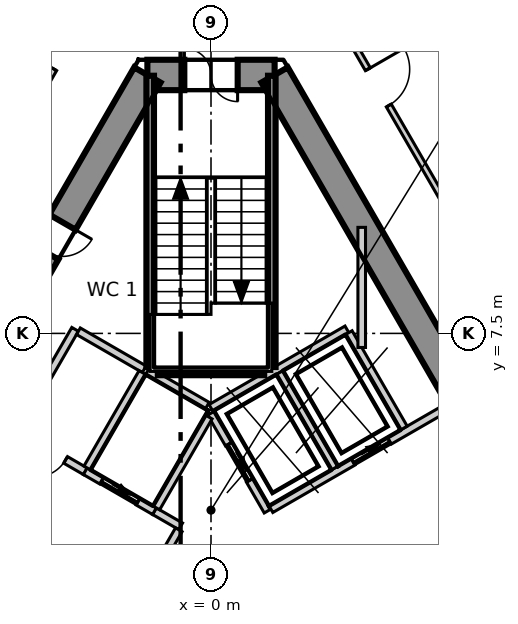
"""IFC4 building model, lengths in metres.
Left out: names, types, materials, properties, quantities, classifications, styles, units other than length and angle.
Written with IfcOpenShell. Run it as: python <this file> out.ifc"""

import sys

from ifc_helpers import new_model, si_unit, direction, frame, frame_2d, origin, place, context, subcontext, project, spatial, polyline, rectangle, outline, extrude, element, fill, save


model = new_model("IFC4")
c1 = context("Model", 3, precision=1e-05, world=origin(), true_north=direction((0.0, 1.0)))
c2 = subcontext(c1, "Body", "Model", "MODEL_VIEW")
j1 = project(units=[si_unit("LENGTHUNIT", "METRE"), si_unit("PLANEANGLEUNIT", "RADIAN")], contexts=[c1])
p1 = place(None, origin())
s1 = spatial("IfcSite", under=j1, at=p1, CompositionType="ELEMENT")
p2 = place(p1, origin())
s2 = spatial("IfcBuilding", under=s1, at=p2, CompositionType="ELEMENT")
p3 = place(p2, frame((0.0, 0.0, 104.3)))
s3 = spatial("IfcBuildingStorey", under=s2, at=p3, CompositionType="ELEMENT", Elevation=104.3)
p4 = place(p3, frame((1.674, 14.3, -0.3), z_axis=(0.0, 0.0, 1.0), x_axis=(-1.0, 0.0, 0.0)))
e1 = element("IfcWall", 1, at=p4, inside=s3, PredefinedType="SHEAR", context=c2, shape_type="SweptSolid", body=[
    extrude(outline(polyline([(-0.231, -0.4), (1.674, -0.4), (3.579, -0.4), (3.117, 0.4), (1.674, 0.4), (0.231, 0.4), (-0.231, -0.4)])), origin(), (0.0, 0.0, 1.0), 4.0),
])
p5 = place(p4, frame((0.974, 0.0, 0.3)))
e2 = element("IfcOpeningElement", 2, at=p5, cuts=e1, PredefinedType="OPENING", context=c2, shape_type="SweptSolid", body=[
    extrude(rectangle(XDim=1.4, YDim=2.1, at=frame_2d((0.7, 1.05))), frame((0.0, 0.41, 0.0), z_axis=(0.0, -1.0, 0.0), x_axis=(1.0, 0.0, 0.0)), (0.0, 0.0, 1.0), 0.82),
])
p6 = place(p3, frame((-1.674, 14.3, -0.3), z_axis=(0.0, 0.0, 1.0), x_axis=(-0.499995765644, -0.866027848477, 0.0)))
e3 = element("IfcWall", 3, at=p6, inside=s3, PredefinedType="SHEAR", context=c2, shape_type="SweptSolid", body=[
    extrude(outline(polyline([(-0.231, -0.4), (1.732, -0.4), (3.695, -0.4), (5.658, -0.4), (7.621, -0.4), (9.584, -0.4), (11.547, -0.4), (13.51, -0.4), (15.473, -0.4), (17.436, -0.4), (19.399, -0.4), (21.362, -0.4), (23.325, -0.4), (22.863, 0.4), (20.977, 0.4), (19.091, 0.4), (17.205, 0.4), (15.319, 0.4), (13.433, 0.4), (11.547, 0.4), (9.661, 0.4), (7.775, 0.4), (5.889, 0.4), (4.003, 0.4), (2.117, 0.4), (0.231, 0.4), (-0.231, -0.4)])), origin(), (0.0, 0.0, 1.0), 4.0),
])
p7 = place(p6, frame((10.997, 0.0, 0.3)))
e4 = element("IfcOpeningElement", 4, at=p7, cuts=e3, PredefinedType="OPENING", context=c2, shape_type="SweptSolid", body=[
    extrude(rectangle(XDim=1.1, YDim=2.1, at=frame_2d((0.55, 1.05))), frame((0.0, 0.41, 0.0), z_axis=(0.0, -1.0, 0.0), x_axis=(1.0, 0.0, 0.0)), (0.0, 0.0, 1.0), 0.82),
])
p8 = place(p6, frame((4.474, 0.0, 0.3)))
e5 = element("IfcOpeningElement", 5, at=p8, cuts=e3, PredefinedType="OPENING", context=c2, shape_type="SweptSolid", body=[
    extrude(rectangle(XDim=0.9, YDim=2.1, at=frame_2d((0.45, 1.05))), frame((0.0, 0.41, 0.0), z_axis=(0.0, -1.0, 0.0), x_axis=(1.0, 0.0, 0.0)), (0.0, 0.0, 1.0), 0.82),
])
p9 = place(p3, frame((13.221, -5.7, -0.3), z_axis=(0.0, 0.0, 1.0), x_axis=(-0.499995765644, 0.866027848477, 0.0)))
e6 = element("IfcWall", 6, at=p9, inside=s3, PredefinedType="SHEAR", context=c2, shape_type="SweptSolid", body=[
    extrude(outline(polyline([(-0.231, -0.4), (1.732, -0.4), (3.695, -0.4), (5.658, -0.4), (7.621, -0.4), (9.584, -0.4), (11.547, -0.4), (13.51, -0.4), (15.473, -0.4), (17.436, -0.4), (19.399, -0.4), (21.362, -0.4), (23.325, -0.4), (22.863, 0.4), (20.977, 0.4), (19.091, 0.4), (17.205, 0.4), (15.319, 0.4), (13.433, 0.4), (11.547, 0.4), (9.661, 0.4), (7.775, 0.4), (5.889, 0.4), (4.003, 0.4), (2.117, 0.4), (0.231, 0.4), (-0.231, -0.4)])), origin(), (0.0, 0.0, 1.0), 4.0),
])
p10 = place(p9, frame((10.647, 0.0, 0.3)))
e7 = element("IfcOpeningElement", 7, at=p10, cuts=e6, PredefinedType="OPENING", context=c2, shape_type="SweptSolid", body=[
    extrude(rectangle(XDim=1.8, YDim=2.1, at=frame_2d((0.9, 1.05))), frame((0.0, 0.41, 0.0), z_axis=(0.0, -1.0, 0.0), x_axis=(1.0, 0.0, 0.0)), (0.0, 0.0, 1.0), 0.82),
])
p11 = place(p9, frame((5.343, 0.0, 0.3)))
e8 = element("IfcOpeningElement", 8, at=p11, cuts=e6, PredefinedType="OPENING", context=c2, shape_type="SweptSolid", body=[
    extrude(rectangle(XDim=0.9, YDim=2.1, at=frame_2d((0.45, 1.05))), frame((0.0, 0.41, 0.0), z_axis=(0.0, -1.0, 0.0), x_axis=(1.0, 0.0, 0.0)), (0.0, 0.0, 1.0), 0.82),
])
p12 = place(p3, frame((-3.2, 35.691, 0.0), z_axis=(0.0, 0.0, 1.0), x_axis=(-0.500010127185, -0.866019556773, 0.0)))
e9 = element("IfcWall", 9, at=p12, inside=s3, PredefinedType="ELEMENTEDWALL", context=c2, shape_type="SweptSolid", body=[
    extrude(rectangle(XDim=58.599, YDim=0.2, at=frame_2d((29.299, 0.0))), origin(), (0.0, 0.0, 1.0), 3.7),
])
p13 = place(p12, frame((2.353, 0.0, 0.9)))
e10 = element("IfcOpeningElement", 10, at=p13, cuts=e9, PredefinedType="OPENING", context=c2, shape_type="SweptSolid", body=[
    extrude(rectangle(XDim=4.9, YDim=2.5, at=frame_2d((2.45, 1.25))), frame((0.0, 0.11, 0.0), z_axis=(0.0, -1.0, 0.0), x_axis=(1.0, 0.0, 0.0)), (0.0, 0.0, 1.0), 0.22),
])
p14 = place(p12, frame((9.355, 0.0, 0.9)))
e11 = element("IfcOpeningElement", 11, at=p14, cuts=e9, PredefinedType="OPENING", context=c2, shape_type="SweptSolid", body=[
    extrude(rectangle(XDim=4.9, YDim=2.5, at=frame_2d((2.45, 1.25))), frame((0.0, 0.11, 0.0), z_axis=(0.0, -1.0, 0.0), x_axis=(1.0, 0.0, 0.0)), (0.0, 0.0, 1.0), 0.22),
])
p15 = place(p12, frame((16.357, 0.0, 0.9)))
e12 = element("IfcOpeningElement", 12, at=p15, cuts=e9, PredefinedType="OPENING", context=c2, shape_type="SweptSolid", body=[
    extrude(rectangle(XDim=4.9, YDim=2.5, at=frame_2d((2.45, 1.25))), frame((0.0, 0.11, 0.0), z_axis=(0.0, -1.0, 0.0), x_axis=(1.0, 0.0, 0.0)), (0.0, 0.0, 1.0), 0.22),
])
p16 = place(p12, frame((23.358, 0.0, 0.9)))
e13 = element("IfcOpeningElement", 13, at=p16, cuts=e9, PredefinedType="OPENING", context=c2, shape_type="SweptSolid", body=[
    extrude(rectangle(XDim=4.9, YDim=2.5, at=frame_2d((2.45, 1.25))), frame((0.0, 0.11, 0.0), z_axis=(0.0, -1.0, 0.0), x_axis=(1.0, 0.0, 0.0)), (0.0, 0.0, 1.0), 0.22),
])
p17 = place(p12, frame((30.36, 0.0, 0.9)))
e14 = element("IfcOpeningElement", 14, at=p17, cuts=e9, PredefinedType="OPENING", context=c2, shape_type="SweptSolid", body=[
    extrude(rectangle(XDim=4.9, YDim=2.5, at=frame_2d((2.45, 1.25))), frame((0.0, 0.11, 0.0), z_axis=(0.0, -1.0, 0.0), x_axis=(1.0, 0.0, 0.0)), (0.0, 0.0, 1.0), 0.22),
])
p18 = place(p12, frame((37.362, 0.0, 0.9)))
e15 = element("IfcOpeningElement", 15, at=p18, cuts=e9, PredefinedType="OPENING", context=c2, shape_type="SweptSolid", body=[
    extrude(rectangle(XDim=4.9, YDim=2.5, at=frame_2d((2.45, 1.25))), frame((0.0, 0.11, 0.0), z_axis=(0.0, -1.0, 0.0), x_axis=(1.0, 0.0, 0.0)), (0.0, 0.0, 1.0), 0.22),
])
p19 = place(p12, frame((44.363, 0.0, 0.9)))
e16 = element("IfcOpeningElement", 16, at=p19, cuts=e9, PredefinedType="OPENING", context=c2, shape_type="SweptSolid", body=[
    extrude(rectangle(XDim=4.9, YDim=2.5, at=frame_2d((2.45, 1.25))), frame((0.0, 0.11, 0.0), z_axis=(0.0, -1.0, 0.0), x_axis=(1.0, 0.0, 0.0)), (0.0, 0.0, 1.0), 0.22),
])
p20 = place(p12, frame((51.365, 0.0, 0.9)))
e17 = element("IfcOpeningElement", 17, at=p20, cuts=e9, PredefinedType="OPENING", context=c2, shape_type="SweptSolid", body=[
    extrude(rectangle(XDim=4.9, YDim=2.5, at=frame_2d((2.45, 1.25))), frame((0.0, 0.11, 0.0), z_axis=(0.0, -1.0, 0.0), x_axis=(1.0, 0.0, 0.0)), (0.0, 0.0, 1.0), 0.22),
])
p21 = place(p3, frame((32.51, -15.074, 0.0), z_axis=(0.0, 0.0, 1.0), x_axis=(-0.500008323105, 0.866020598384, 0.0)))
e18 = element("IfcWall", 18, at=p21, inside=s3, PredefinedType="ELEMENTEDWALL", context=c2, shape_type="SweptSolid", body=[
    extrude(rectangle(XDim=58.599, YDim=0.2, at=frame_2d((29.3, 0.0))), origin(), (0.0, 0.0, 1.0), 3.7),
])
p22 = place(p21, frame((2.354, 0.0, 0.9)))
e19 = element("IfcOpeningElement", 19, at=p22, cuts=e18, PredefinedType="OPENING", context=c2, shape_type="SweptSolid", body=[
    extrude(rectangle(XDim=4.9, YDim=2.5, at=frame_2d((2.45, 1.25))), frame((0.0, 0.11, 0.0), z_axis=(0.0, -1.0, 0.0), x_axis=(1.0, 0.0, 0.0)), (0.0, 0.0, 1.0), 0.22),
])
p23 = place(p21, frame((9.355, 0.0, 0.9)))
e20 = element("IfcOpeningElement", 20, at=p23, cuts=e18, PredefinedType="OPENING", context=c2, shape_type="SweptSolid", body=[
    extrude(rectangle(XDim=4.9, YDim=2.5, at=frame_2d((2.45, 1.25))), frame((0.0, 0.11, 0.0), z_axis=(0.0, -1.0, 0.0), x_axis=(1.0, 0.0, 0.0)), (0.0, 0.0, 1.0), 0.22),
])
p24 = place(p21, frame((16.357, 0.0, 0.9)))
e21 = element("IfcOpeningElement", 21, at=p24, cuts=e18, PredefinedType="OPENING", context=c2, shape_type="SweptSolid", body=[
    extrude(rectangle(XDim=4.9, YDim=2.5, at=frame_2d((2.45, 1.25))), frame((0.0, 0.11, 0.0), z_axis=(0.0, -1.0, 0.0), x_axis=(1.0, 0.0, 0.0)), (0.0, 0.0, 1.0), 0.22),
])
p25 = place(p21, frame((23.359, 0.0, 0.9)))
e22 = element("IfcOpeningElement", 22, at=p25, cuts=e18, PredefinedType="OPENING", context=c2, shape_type="SweptSolid", body=[
    extrude(rectangle(XDim=4.9, YDim=2.5, at=frame_2d((2.45, 1.25))), frame((0.0, 0.11, 0.0), z_axis=(0.0, -1.0, 0.0), x_axis=(1.0, 0.0, 0.0)), (0.0, 0.0, 1.0), 0.22),
])
p26 = place(p21, frame((30.36, 0.0, 0.9)))
e23 = element("IfcOpeningElement", 23, at=p26, cuts=e18, PredefinedType="OPENING", context=c2, shape_type="SweptSolid", body=[
    extrude(rectangle(XDim=4.9, YDim=2.5, at=frame_2d((2.45, 1.25))), frame((0.0, 0.11, 0.0), z_axis=(0.0, -1.0, 0.0), x_axis=(1.0, 0.0, 0.0)), (0.0, 0.0, 1.0), 0.22),
])
p27 = place(p21, frame((37.362, 0.0, 0.9)))
e24 = element("IfcOpeningElement", 24, at=p27, cuts=e18, PredefinedType="OPENING", context=c2, shape_type="SweptSolid", body=[
    extrude(rectangle(XDim=4.9, YDim=2.5, at=frame_2d((2.45, 1.25))), frame((0.0, 0.11, 0.0), z_axis=(0.0, -1.0, 0.0), x_axis=(1.0, 0.0, 0.0)), (0.0, 0.0, 1.0), 0.22),
])
p28 = place(p21, frame((44.364, 0.0, 0.9)))
e25 = element("IfcOpeningElement", 25, at=p28, cuts=e18, PredefinedType="OPENING", context=c2, shape_type="SweptSolid", body=[
    extrude(rectangle(XDim=4.9, YDim=2.5, at=frame_2d((2.45, 1.25))), frame((0.0, 0.11, 0.0), z_axis=(0.0, -1.0, 0.0), x_axis=(1.0, 0.0, 0.0)), (0.0, 0.0, 1.0), 0.22),
])
p29 = place(p21, frame((51.365, 0.0, 0.9)))
e26 = element("IfcOpeningElement", 26, at=p29, cuts=e18, PredefinedType="OPENING", context=c2, shape_type="SweptSolid", body=[
    extrude(rectangle(XDim=4.9, YDim=2.5, at=frame_2d((2.45, 1.25))), frame((0.0, 0.11, 0.0), z_axis=(0.0, -1.0, 0.0), x_axis=(1.0, 0.0, 0.0)), (0.0, 0.0, 1.0), 0.22),
])
p30 = place(p3, frame((-5.402, 12.244, 0.0), z_axis=(0.0, 0.0, 1.0), x_axis=(0.500020433321, 0.86601360628, 0.0)))
e27 = element("IfcWall", 27, at=p30, inside=s3, PredefinedType="PARTITIONING", context=c2, shape_type="SweptSolid", body=[
    extrude(rectangle(XDim=10.804, YDim=0.15, at=frame_2d((5.402, 0.0))), origin(), (0.0, 0.0, 1.0), 3.7),
])
p31 = place(p30, frame((7.954, 0.0, 0.0)))
e28 = element("IfcOpeningElement", 28, at=p31, cuts=e27, PredefinedType="OPENING", context=c2, shape_type="SweptSolid", body=[
    extrude(rectangle(XDim=1.0, YDim=2.1, at=frame_2d((0.5, 1.05))), frame((0.0, 0.085, 0.0), z_axis=(0.0, -1.0, 0.0), x_axis=(1.0, 0.0, 0.0)), (0.0, 0.0, 1.0), 0.17),
])
p32 = place(p30, frame((2.551, 0.0, 0.0)))
e29 = element("IfcOpeningElement", 29, at=p32, cuts=e27, PredefinedType="OPENING", context=c2, shape_type="SweptSolid", body=[
    extrude(rectangle(XDim=1.0, YDim=2.1, at=frame_2d((0.5, 1.05))), frame((0.0, 0.085, 0.0), z_axis=(0.0, -1.0, 0.0), x_axis=(1.0, 0.0, 0.0)), (0.0, 0.0, 1.0), 0.17),
])
p33 = place(p3, frame((0.076, 21.468, 0.0), z_axis=(0.0, 0.0, 1.0), x_axis=(0.500024127084, -0.866011473558, 0.0)))
e30 = element("IfcWall", 30, at=p33, inside=s3, PredefinedType="PARTITIONING", context=c2, shape_type="SweptSolid", body=[
    extrude(rectangle(XDim=17.654, YDim=0.15, at=frame_2d((8.827, 0.0))), origin(), (0.0, 0.0, 1.0), 3.7),
])
p34 = place(p33, frame((8.104, 0.0, 0.0)))
e31 = element("IfcOpeningElement", 31, at=p34, cuts=e30, PredefinedType="OPENING", context=c2, shape_type="SweptSolid", body=[
    extrude(rectangle(XDim=1.1, YDim=2.1, at=frame_2d((0.55, 1.05))), frame((0.0, 0.085, 0.0), z_axis=(0.0, -1.0, 0.0), x_axis=(1.0, 0.0, 0.0)), (0.0, 0.0, 1.0), 0.17),
])
p35 = place(p33, frame((13.504, 0.0, 0.0)))
e32 = element("IfcOpeningElement", 32, at=p35, cuts=e30, PredefinedType="OPENING", context=c2, shape_type="SweptSolid", body=[
    extrude(rectangle(XDim=0.9, YDim=2.1, at=frame_2d((0.45, 1.05))), frame((0.0, 0.085, 0.0), z_axis=(0.0, -1.0, 0.0), x_axis=(1.0, 0.0, 0.0)), (0.0, 0.0, 1.0), 0.17),
])
p36 = place(p33, frame((1.6, 0.0, 0.0)))
e33 = element("IfcOpeningElement", 33, at=p36, cuts=e30, PredefinedType="OPENING", context=c2, shape_type="SweptSolid", body=[
    extrude(rectangle(XDim=1.1, YDim=2.1, at=frame_2d((0.55, 1.05))), frame((0.0, 0.085, 0.0), z_axis=(0.0, -1.0, 0.0), x_axis=(1.0, 0.0, 0.0)), (0.0, 0.0, 1.0), 0.17),
])
p37 = place(p3, frame((-0.002, 5.541, 0.0), z_axis=(0.0, 0.0, 1.0), x_axis=(0.86600155993, 0.500041296494, 0.0)))
e34 = element("IfcWall", 34, at=p37, inside=s3, PredefinedType="SOLIDWALL", context=c2, shape_type="SweptSolid", body=[
    extrude(rectangle(XDim=4.132, YDim=0.2, at=frame_2d((2.066, 0.0))), origin(), (0.0, 0.0, 1.0), 3.7),
])
p38 = place(p3, frame((0.0, 5.4, 0.0), z_axis=(0.0, 0.0, 1.0), x_axis=(0.500103862429, -0.865965430478, 0.0)))
e35 = element("IfcWall", 35, at=p38, inside=s3, PredefinedType="SOLIDWALL", context=c2, shape_type="SweptSolid", body=[
    extrude(rectangle(XDim=2.973, YDim=0.2, at=frame_2d((1.487, 0.0))), origin(), (0.0, 0.0, 1.0), 3.7),
])
p39 = place(p38, frame((0.937, 0.0, 0.0)))
e36 = element("IfcOpeningElement", 36, at=p39, cuts=e35, PredefinedType="OPENING", context=c2, shape_type="SweptSolid", body=[
    extrude(rectangle(XDim=1.1, YDim=2.1, at=frame_2d((0.55, 1.05))), frame((0.0, 0.11, 0.0), z_axis=(0.0, -1.0, 0.0), x_axis=(1.0, 0.0, 0.0)), (0.0, 0.0, 1.0), 0.22),
])
p40 = place(p3, frame((1.577, 2.874, 0.0), z_axis=(0.0, 0.0, 1.0), x_axis=(0.866073694534, 0.499916348638, 0.0)))
e37 = element("IfcWall", 37, at=p40, inside=s3, PredefinedType="SOLIDWALL", context=c2, shape_type="SweptSolid", body=[
    extrude(rectangle(XDim=5.777, YDim=0.2, at=frame_2d((2.888, 0.0))), origin(), (0.0, 0.0, 1.0), 3.7),
])
p41 = place(p40, frame((2.497, 0.0, 0.0)))
e38 = element("IfcOpeningElement", 38, at=p41, cuts=e37, PredefinedType="OPENING", context=c2, shape_type="SweptSolid", body=[
    extrude(rectangle(XDim=1.1, YDim=2.1, at=frame_2d((0.55, 1.05))), frame((0.0, 0.11, 0.0), z_axis=(0.0, -1.0, 0.0), x_axis=(1.0, 0.0, 0.0)), (0.0, 0.0, 1.0), 0.22),
])
p42 = place(p3, frame((3.278, -0.071, 0.0), z_axis=(0.0, 0.0, 1.0), x_axis=(0.865929348003, 0.5001663366, 0.0)))
e39 = element("IfcWall", 39, at=p42, inside=s3, PredefinedType="SOLIDWALL", context=c2, shape_type="SweptSolid", body=[
    extrude(rectangle(XDim=5.776, YDim=0.2, at=frame_2d((2.888, 0.0))), origin(), (0.0, 0.0, 1.0), 3.7),
])
for number, where, z_axis, x_axis in (
    (40, (3.626, 7.52, 0.0), (0.0, 0.0, 1.0), (0.5, -0.866, 0.0)),
    (41, (1.807, 6.47, 0.0), (0.0, 0.0, 1.0), (0.5, -0.866, 0.0)),
):
    element("IfcWall", number, at=place(p3, frame(where, z_axis=z_axis, x_axis=x_axis)), inside=s3, PredefinedType="SOLIDWALL", context=c2, shape_type="SweptSolid", body=[
        extrude(rectangle(XDim=2.9, YDim=0.2, at=frame_2d((1.45, 0.0))), origin(), (0.0, 0.0, 1.0), 3.7),
    ])
p43 = place(p3, frame((-6.58, 5.762, 0.0), z_axis=(0.0, 0.0, 1.0), x_axis=(0.866029704776, -0.49999255039, 0.0)))
e42 = element("IfcWall", 42, at=p43, inside=s3, PredefinedType="SOLIDWALL", context=c2, shape_type="SweptSolid", body=[
    extrude(rectangle(XDim=3.782, YDim=0.2, at=frame_2d((1.891, 0.0))), origin(), (0.0, 0.0, 1.0), 3.7),
])
p44 = place(p43, frame((2.279, 0.0, 0.0)))
e43 = element("IfcOpeningElement", 43, at=p44, cuts=e42, PredefinedType="OPENING", context=c2, shape_type="SweptSolid", body=[
    extrude(rectangle(XDim=0.9, YDim=2.1, at=frame_2d((0.45, 1.05))), frame((0.0, 0.11, 0.0), z_axis=(0.0, -1.0, 0.0), x_axis=(1.0, 0.0, 0.0)), (0.0, 0.0, 1.0), 0.22),
])
p45 = place(p3, frame((-1.488, 2.822, 0.0), z_axis=(0.0, 0.0, 1.0), x_axis=(0.866236612152, -0.499633997809, 0.0)))
e44 = element("IfcWall", 44, at=p45, inside=s3, PredefinedType="SOLIDWALL", context=c2, shape_type="SweptSolid", body=[
    extrude(rectangle(XDim=0.796, YDim=0.2, at=frame_2d((0.398, 0.0))), origin(), (0.0, 0.0, 1.0), 3.7),
])
p46 = place(p3, frame((-5.076, 5.009, 0.0), z_axis=(0.0, 0.0, 1.0), x_axis=(0.50002537861, 0.866010750942, 0.0)))
e45 = element("IfcWall", 45, at=p46, inside=s3, PredefinedType="SOLIDWALL", context=c2, shape_type="SweptSolid", body=[
    extrude(rectangle(XDim=3.0, YDim=0.2, at=frame_2d((1.5, 0.0))), origin(), (0.0, 0.0, 1.0), 3.7),
])
p47 = place(p3, frame((-3.489, 7.557, 0.0), z_axis=(0.0, 0.0, 1.0), x_axis=(0.866010750942, -0.50002537861, 0.0)))
e46 = element("IfcWall", 46, at=p47, inside=s3, PredefinedType="SOLIDWALL", context=c2, shape_type="SweptSolid", body=[
    extrude(rectangle(XDim=2.0, YDim=0.2, at=frame_2d((1.0, 0.0))), origin(), (0.0, 0.0, 1.0), 3.7),
])
p48 = place(p3, frame((-2.444, -0.433, 0.0), z_axis=(0.0, 0.0, 1.0), x_axis=(0.500035624827, 0.866004834804, 0.0)))
e47 = element("IfcWall", 47, at=p48, inside=s3, PredefinedType="SOLIDWALL", context=c2, shape_type="SweptSolid", body=[
    extrude(rectangle(XDim=3.194, YDim=0.2, at=frame_2d((1.597, 0.0))), origin(), (0.0, 0.0, 1.0), 3.7),
])
p49 = place(p3, frame((-3.309, 3.873, 0.0), z_axis=(0.0, 0.0, 1.0), x_axis=(0.866098583652, -0.499873227325, 0.0)))
e48 = element("IfcWall", 48, at=p49, inside=s3, PredefinedType="SOLIDWALL", context=c2, shape_type="SweptSolid", body=[
    extrude(rectangle(XDim=2.103, YDim=0.2, at=frame_2d((1.051, 0.0))), origin(), (0.0, 0.0, 1.0), 3.7),
])
p50 = place(p49, frame((0.502, 0.0, 0.0)))
e49 = element("IfcOpeningElement", 49, at=p50, cuts=e48, PredefinedType="OPENING", context=c2, shape_type="SweptSolid", body=[
    extrude(rectangle(XDim=1.1, YDim=2.1, at=frame_2d((0.55, 1.05))), frame((0.0, 0.11, 0.0), z_axis=(0.0, -1.0, 0.0), x_axis=(1.0, 0.0, 0.0)), (0.0, 0.0, 1.0), 0.22),
])
p51 = place(p3, frame((-3.257, 3.959, 0.0), z_axis=(0.0, 0.0, 1.0), x_axis=(0.50012328804, 0.865954211699, 0.0)))
e50 = element("IfcWall", 50, at=p51, inside=s3, PredefinedType="SOLIDWALL", context=c2, shape_type="SweptSolid", body=[
    extrude(rectangle(XDim=2.9, YDim=0.2, at=frame_2d((1.45, 0.0))), origin(), (0.0, 0.0, 1.0), 3.7),
])
p52 = place(p3, frame((-1.67, 6.507, 0.0), z_axis=(0.0, 0.0, 1.0), x_axis=(0.865941441609, -0.500145398563, 0.0)))
e51 = element("IfcWall", 51, at=p52, inside=s3, PredefinedType="SOLIDWALL", context=c2, shape_type="SweptSolid", body=[
    extrude(rectangle(XDim=1.815, YDim=0.2, at=frame_2d((0.908, 0.0))), origin(), (0.0, 0.0, 1.0), 3.7),
])
p53 = place(p3, frame((-1.438, 2.909, 0.0), z_axis=(0.0, 0.0, 1.0), x_axis=(0.499829630636, 0.866123744241, 0.0)))
e52 = element("IfcWall", 52, at=p53, inside=s3, PredefinedType="SOLIDWALL", context=c2, shape_type="SweptSolid", body=[
    extrude(rectangle(XDim=2.761, YDim=0.2, at=frame_2d((1.38, 0.0))), origin(), (0.0, 0.0, 1.0), 3.7),
])
p54 = place(p3, frame((3.966, 7.13, 0.0), z_axis=(0.0, 0.0, 1.0), x_axis=(0.0, 1.0, 0.0)))
e53 = element("IfcWall", 53, at=p54, inside=s3, PredefinedType="SOLIDWALL", context=c2, shape_type="SweptSolid", body=[
    extrude(rectangle(XDim=3.16, YDim=0.2, at=frame_2d((1.58, 0.0))), origin(), (0.0, 0.0, 1.0), 3.7),
])
p55 = place(p3, frame((1.6, 6.615, 0.0), z_axis=(0.0, 0.0, 1.0), x_axis=(0.0, 1.0, 0.0)))
e54 = element("IfcWall", 54, at=p55, inside=s3, PredefinedType="SOLIDWALL", context=c2, shape_type="SweptSolid", body=[
    extrude(rectangle(XDim=7.665, YDim=0.2, at=frame_2d((3.833, 0.0))), origin(), (0.0, 0.0, 1.0), 3.7),
])
p56 = place(p3, frame((-1.4, 6.5, 0.0), z_axis=(0.0, 0.0, 1.0), x_axis=(1.0, 0.0, 0.0)))
e55 = element("IfcWall", 55, at=p56, inside=s3, PredefinedType="SOLIDWALL", context=c2, shape_type="SweptSolid", body=[
    extrude(rectangle(XDim=2.8, YDim=0.2, at=frame_2d((1.4, 0.0))), origin(), (0.0, 0.0, 1.0), 3.7),
])
p57 = place(p3, frame((-1.6, 6.615, 0.0), z_axis=(0.0, 0.0, 1.0), x_axis=(0.0, 1.0, 0.0)))
e56 = element("IfcWall", 56, at=p57, inside=s3, PredefinedType="SOLIDWALL", context=c2, shape_type="SweptSolid", body=[
    extrude(rectangle(XDim=7.665, YDim=0.2, at=frame_2d((3.833, 0.0))), origin(), (0.0, 0.0, 1.0), 3.7),
])
p58 = place(p39, origin())
e57 = element("IfcDoor", 57, at=p58, inside=s3, OperationType="SLIDING_TO_LEFT", PredefinedType="DOOR", context=c2, shape_type="SweptSolid", body=[
    extrude(rectangle(XDim=1.1, YDim=2.1, at=frame_2d((0.55, 1.05))), frame((0.0, 0.025, 0.0), z_axis=(0.0, -1.0, 0.0), x_axis=(1.0, 0.0, 0.0)), (0.0, 0.0, 1.0), 0.05),
])
fill(e36, e57)
p59 = place(p41, origin())
e58 = element("IfcDoor", 58, at=p59, inside=s3, OperationType="SLIDING_TO_LEFT", PredefinedType="DOOR", context=c2, shape_type="SweptSolid", body=[
    extrude(rectangle(XDim=1.1, YDim=2.1, at=frame_2d((0.55, 1.05))), frame((0.0, 0.025, 0.0), z_axis=(0.0, -1.0, 0.0), x_axis=(1.0, 0.0, 0.0)), (0.0, 0.0, 1.0), 0.05),
])
fill(e38, e58)
p60 = place(p50, origin())
e59 = element("IfcDoor", 59, at=p60, inside=s3, OperationType="SLIDING_TO_LEFT", PredefinedType="DOOR", context=c2, shape_type="SweptSolid", body=[
    extrude(rectangle(XDim=1.1, YDim=2.1, at=frame_2d((0.55, 1.05))), frame((0.0, 0.025, 0.0), z_axis=(0.0, -1.0, 0.0), x_axis=(1.0, 0.0, 0.0)), (0.0, 0.0, 1.0), 0.05),
])
fill(e49, e59)
p61 = place(p44, origin())
e60 = element("IfcDoor", 60, at=p61, inside=s3, OperationType="SINGLE_SWING_LEFT", PredefinedType="DOOR", context=c2, shape_type="SweptSolid", body=[
    extrude(rectangle(XDim=0.9, YDim=2.1, at=frame_2d((0.45, 1.05))), frame((0.0, 0.025, 0.0), z_axis=(0.0, -1.0, 0.0), x_axis=(1.0, 0.0, 0.0)), (0.0, 0.0, 1.0), 0.05),
])
fill(e43, e60)
p62 = place(p34, origin())
e61 = element("IfcDoor", 61, at=p62, inside=s3, OperationType="SINGLE_SWING_RIGHT", PredefinedType="DOOR", context=c2, shape_type="SweptSolid", body=[
    extrude(rectangle(XDim=1.1, YDim=2.1, at=frame_2d((0.55, 1.05))), frame((0.0, 0.025, 0.0), z_axis=(0.0, -1.0, 0.0), x_axis=(1.0, 0.0, 0.0)), (0.0, 0.0, 1.0), 0.05),
])
fill(e31, e61)
p63 = place(p32, origin())
e62 = element("IfcDoor", 62, at=p63, inside=s3, OperationType="SINGLE_SWING_LEFT", PredefinedType="DOOR", context=c2, shape_type="SweptSolid", body=[
    extrude(rectangle(XDim=1.0, YDim=2.1, at=frame_2d((0.5, 1.05))), frame((0.0, 0.025, 0.0), z_axis=(0.0, -1.0, 0.0), x_axis=(1.0, 0.0, 0.0)), (0.0, 0.0, 1.0), 0.05),
])
fill(e29, e62)
p64 = place(p5, origin())
e63 = element("IfcDoor", 63, at=p64, inside=s3, OperationType="DOUBLE_DOOR_SINGLE_SWING", PredefinedType="DOOR", context=c2, shape_type="SweptSolid", body=[
    extrude(rectangle(XDim=1.4, YDim=2.1, at=frame_2d((0.7, 1.05))), frame((0.0, 0.025, 0.0), z_axis=(0.0, -1.0, 0.0), x_axis=(1.0, 0.0, 0.0)), (0.0, 0.0, 1.0), 0.05),
])
fill(e2, e63)
p65 = place(p8, origin())
e64 = element("IfcDoor", 64, at=p65, inside=s3, OperationType="SINGLE_SWING_RIGHT", PredefinedType="DOOR", context=c2, shape_type="SweptSolid", body=[
    extrude(rectangle(XDim=0.9, YDim=2.1, at=frame_2d((0.45, 1.05))), frame((0.0, 0.025, 0.0), z_axis=(0.0, -1.0, 0.0), x_axis=(1.0, 0.0, 0.0)), (0.0, 0.0, 1.0), 0.05),
])
fill(e5, e64)
save(model, sys.argv[1])
